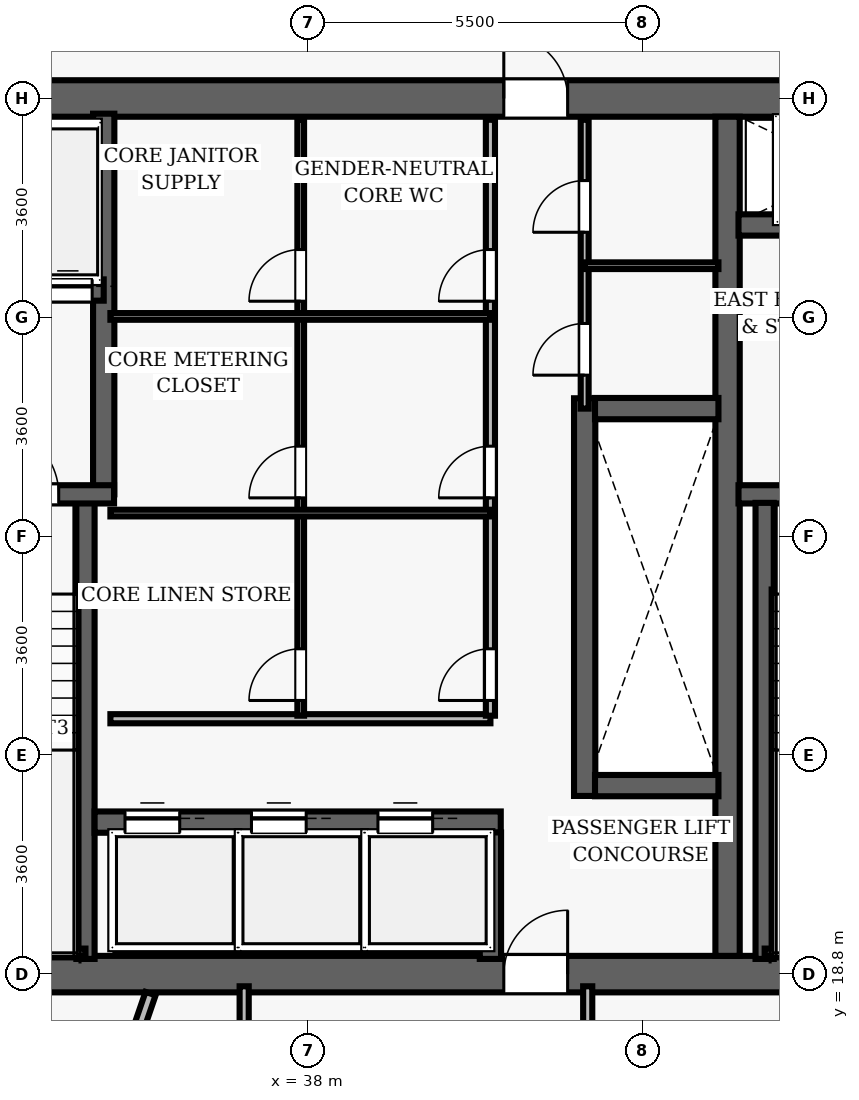
"""IFC4 building model, lengths in metres.
Left out: names, types, materials, properties, quantities, classifications, styles, units other than length and angle.
Written with IfcOpenShell. Run it as: python <this file> out.ifc"""

import sys

from ifc_helpers import new_model, si_unit, direction, frame, frame_2d, origin, place, context, subcontext, project, spatial, rectangle, extrude, element, fill, save


model = new_model("IFC4")
c1 = context("Model", 3, precision=1e-05, world=origin(), true_north=direction((0.0, 1.0)))
c2 = subcontext(c1, "Body", "Model", "MODEL_VIEW")
j1 = project(units=[si_unit("LENGTHUNIT", "METRE"), si_unit("PLANEANGLEUNIT", "RADIAN")], contexts=[c1])
p1 = place(None, origin())
s1 = spatial("IfcSite", under=j1, at=p1, CompositionType="ELEMENT")
p2 = place(p1, origin())
s2 = spatial("IfcBuilding", under=s1, at=p2, CompositionType="ELEMENT")
p3 = place(p2, frame((0.0, 0.0, 109.8)))
s3 = spatial("IfcBuildingStorey", under=s2, at=p3, CompositionType="ELEMENT", Elevation=109.8)
p4 = place(p3, frame((26.7, 18.8, 0.0), z_axis=(0.0, 0.0, 1.0), x_axis=(1.0, 0.0, 0.0)))
e1 = element("IfcWall", 1, at=p4, inside=s3, PredefinedType="SHEAR", context=c2, shape_type="SweptSolid", body=[
    extrude(rectangle(XDim=22.6, YDim=0.6, at=frame_2d((11.3, 0.0))), origin(), (0.0, 0.0, 1.0), 3.5),
])
p5 = place(p4, frame((14.52, 0.0, 0.0)))
e2 = element("IfcOpeningElement", 2, at=p5, cuts=e1, PredefinedType="OPENING", context=c2, shape_type="SweptSolid", body=[
    extrude(rectangle(XDim=1.05, YDim=2.15, at=frame_2d((0.525, 1.075))), frame((0.0, 0.31, 0.0), z_axis=(0.0, -1.0, 0.0), x_axis=(1.0, 0.0, 0.0)), (0.0, 0.0, 1.0), 0.62),
])
p6 = place(p3, frame((26.7, 33.2, 0.0), z_axis=(0.0, 0.0, 1.0), x_axis=(1.0, 0.0, 0.0)))
e3 = element("IfcWall", 3, at=p6, inside=s3, PredefinedType="SHEAR", context=c2, shape_type="SweptSolid", body=[
    extrude(rectangle(XDim=22.6, YDim=0.6, at=frame_2d((11.3, 0.0))), origin(), (0.0, 0.0, 1.0), 3.5),
])
p7 = place(p6, frame((4.62, 0.0, 0.0)))
e4 = element("IfcOpeningElement", 4, at=p7, cuts=e3, PredefinedType="OPENING", context=c2, shape_type="SweptSolid", body=[
    extrude(rectangle(XDim=1.05, YDim=2.15, at=frame_2d((0.525, 1.075))), frame((0.0, 0.31, 0.0), z_axis=(0.0, -1.0, 0.0), x_axis=(1.0, 0.0, 0.0)), (0.0, 0.0, 1.0), 0.62),
])
p8 = place(p6, frame((14.52, 0.0, 0.0)))
e5 = element("IfcOpeningElement", 5, at=p8, cuts=e3, PredefinedType="OPENING", context=c2, shape_type="SweptSolid", body=[
    extrude(rectangle(XDim=1.05, YDim=2.15, at=frame_2d((0.525, 1.075))), frame((0.0, 0.31, 0.0), z_axis=(0.0, -1.0, 0.0), x_axis=(1.0, 0.0, 0.0)), (0.0, 0.0, 1.0), 0.62),
])
p9 = place(p3, frame((44.9, 19.1, 0.0), z_axis=(0.0, 0.0, 1.0), x_axis=(0.0, 1.0, 0.0)))
e6 = element("IfcWall", 6, at=p9, inside=s3, PredefinedType="SHEAR", context=c2, shape_type="SweptSolid", body=[
    extrude(rectangle(XDim=13.8, YDim=0.4, at=frame_2d((6.9, 0.0))), origin(), (0.0, 0.0, 1.0), 3.5),
])
p10 = place(p3, frame((45.08, 26.69, 0.0), z_axis=(0.0, 0.0, 1.0), x_axis=(1.0, 0.0, 0.0)))
e7 = element("IfcWall", 7, at=p10, inside=s3, PredefinedType="SHEAR", context=c2, shape_type="SweptSolid", body=[
    extrude(rectangle(XDim=3.67, YDim=0.3, at=frame_2d((1.835, 0.0))), origin(), (0.0, 0.0, 1.0), 3.5),
])
p11 = place(p10, frame((1.05, 0.0, 0.0)))
e8 = element("IfcOpeningElement", 8, at=p11, cuts=e7, PredefinedType="OPENING", context=c2, shape_type="SweptSolid", body=[
    extrude(rectangle(XDim=1.1, YDim=2.15, at=frame_2d((0.55, 1.075))), frame((0.0, 0.16, 0.0), z_axis=(0.0, -1.0, 0.0), x_axis=(1.0, 0.0, 0.0)), (0.0, 0.0, 1.0), 0.32),
])
p12 = place(p3, frame((45.51, 19.05, 0.0), z_axis=(0.0, 0.0, 1.0), x_axis=(0.0, 1.0, 0.0)))
e9 = element("IfcWall", 9, at=p12, inside=s3, PredefinedType="SHEAR", context=c2, shape_type="SweptSolid", body=[
    extrude(rectangle(XDim=7.5, YDim=0.3, at=frame_2d((3.75, 0.0))), origin(), (0.0, 0.0, 1.0), 3.5),
])
p13 = place(p3, frame((45.51, 19.16, 0.0), z_axis=(0.0, 0.0, 1.0), x_axis=(1.0, 0.0, 0.0)))
e10 = element("IfcWall", 10, at=p13, inside=s3, PredefinedType="SHEAR", context=c2, shape_type="SweptSolid", body=[
    extrude(rectangle(XDim=3.095, YDim=0.12, at=frame_2d((1.547, 0.0))), origin(), (0.0, 0.0, 1.0), 3.5),
])
p14 = place(p3, frame((45.08, 31.12, 0.0), z_axis=(0.0, 0.0, 1.0), x_axis=(1.0, 0.0, 0.0)))
e11 = element("IfcWall", 11, at=p14, inside=s3, PredefinedType="SHEAR", context=c2, shape_type="SweptSolid", body=[
    extrude(rectangle(XDim=3.67, YDim=0.35, at=frame_2d((1.835, 0.0))), origin(), (0.0, 0.0, 1.0), 2.675),
])
p15 = place(p14, frame((1.25, 0.0, 0.0)))
e12 = element("IfcOpeningElement", 12, at=p15, cuts=e11, PredefinedType="OPENING", context=c2, shape_type="SweptSolid", body=[
    extrude(rectangle(XDim=1.1, YDim=2.15, at=frame_2d((0.55, 1.075))), frame((0.0, 0.185, 0.0), z_axis=(0.0, -1.0, 0.0), x_axis=(1.0, 0.0, 0.0)), (0.0, 0.0, 1.0), 0.37),
])
p16 = place(p3, frame((34.34, 19.05, 0.0), z_axis=(0.0, 0.0, 1.0), x_axis=(0.0, 1.0, 0.0)))
e13 = element("IfcWall", 13, at=p16, inside=s3, PredefinedType="SHEAR", context=c2, shape_type="SweptSolid", body=[
    extrude(rectangle(XDim=7.5, YDim=0.3, at=frame_2d((3.75, 0.0))), origin(), (0.0, 0.0, 1.0), 3.5),
])
p17 = place(p3, frame((34.64, 26.69, 0.0), z_axis=(0.0, 0.0, 1.0), x_axis=(0.0, 1.0, 0.0)))
e14 = element("IfcWall", 14, at=p17, inside=s3, PredefinedType="SHEAR", context=c2, shape_type="SweptSolid", body=[
    extrude(rectangle(XDim=6.26, YDim=0.35, at=frame_2d((3.13, 0.0))), origin(), (0.0, 0.0, 1.0), 3.5),
])
p18 = place(p3, frame((31.25, 26.69, 0.0), z_axis=(0.0, 0.0, 1.0), x_axis=(1.0, 0.0, 0.0)))
e15 = element("IfcWall", 15, at=p18, inside=s3, PredefinedType="SHEAR", context=c2, shape_type="SweptSolid", body=[
    extrude(rectangle(XDim=3.56, YDim=0.3, at=frame_2d((1.78, 0.0))), origin(), (0.0, 0.0, 1.0), 3.5),
])
p19 = place(p18, frame((1.55, 0.0, 0.0)))
e16 = element("IfcOpeningElement", 16, at=p19, cuts=e15, PredefinedType="OPENING", context=c2, shape_type="SweptSolid", body=[
    extrude(rectangle(XDim=1.1, YDim=2.15, at=frame_2d((0.55, 1.075))), frame((0.0, 0.16, 0.0), z_axis=(0.0, -1.0, 0.0), x_axis=(1.0, 0.0, 0.0)), (0.0, 0.0, 1.0), 0.32),
])
p20 = place(p3, frame((31.3, 19.16, 0.0), z_axis=(0.0, 0.0, 1.0), x_axis=(1.0, 0.0, 0.0)))
e17 = element("IfcWall", 17, at=p20, inside=s3, PredefinedType="SHEAR", context=c2, shape_type="SweptSolid", body=[
    extrude(rectangle(XDim=3.04, YDim=0.12, at=frame_2d((1.52, 0.0))), origin(), (0.0, 0.0, 1.0), 3.5),
])
p21 = place(p3, frame((32.23, 30.05, 0.0), z_axis=(0.0, 0.0, 1.0), x_axis=(1.0, 0.0, 0.0)))
e18 = element("IfcWall", 18, at=p21, inside=s3, PredefinedType="SHEAR", context=c2, shape_type="SweptSolid", body=[
    extrude(rectangle(XDim=2.41, YDim=0.35, at=frame_2d((1.205, 0.0))), origin(), (0.0, 0.0, 1.0), 2.675),
])
p22 = place(p21, frame((0.42, 0.0, 0.0)))
e19 = element("IfcOpeningElement", 19, at=p22, cuts=e18, PredefinedType="OPENING", context=c2, shape_type="SweptSolid", body=[
    extrude(rectangle(XDim=0.8, YDim=2.15, at=frame_2d((0.4, 1.075))), frame((0.0, 0.185, 0.0), z_axis=(0.0, -1.0, 0.0), x_axis=(1.0, 0.0, 0.0)), (0.0, 0.0, 1.0), 0.37),
])
p23 = place(p21, frame((1.42, 0.0, 0.0)))
e20 = element("IfcOpeningElement", 20, at=p23, cuts=e18, PredefinedType="OPENING", context=c2, shape_type="SweptSolid", body=[
    extrude(rectangle(XDim=0.8, YDim=2.15, at=frame_2d((0.4, 1.075))), frame((0.0, 0.185, 0.0), z_axis=(0.0, -1.0, 0.0), x_axis=(1.0, 0.0, 0.0)), (0.0, 0.0, 1.0), 0.37),
])
p24 = place(p3, frame((42.55, 21.73, 0.0), z_axis=(0.0, 0.0, 1.0), x_axis=(0.0, 1.0, 0.0)))
e21 = element("IfcWall", 21, at=p24, inside=s3, PredefinedType="SHEAR", context=c2, shape_type="SweptSolid", body=[
    extrude(rectangle(XDim=6.54, YDim=0.35, at=frame_2d((3.27, 0.0))), origin(), (0.0, 0.0, 1.0), 2.675),
])
for number, where, z_axis, x_axis in (
    (22, (42.72, 21.9, 0.0), (0.0, 0.0, 1.0), (1.0, 0.0, 0.0)),
    (23, (42.72, 28.1, 0.0), (0.0, 0.0, 1.0), (1.0, 0.0, 0.0)),
):
    element("IfcWall", number, at=place(p3, frame(where, z_axis=z_axis, x_axis=x_axis)), inside=s3, PredefinedType="SHEAR", context=c2, shape_type="SweptSolid", body=[
        extrude(rectangle(XDim=2.03, YDim=0.35, at=frame_2d((1.015, 0.0))), origin(), (0.0, 0.0, 1.0), 2.675),
    ])
p25 = place(p3, frame((34.49, 21.3, 0.0), z_axis=(0.0, 0.0, 1.0), x_axis=(1.0, 0.0, 0.0)))
e24 = element("IfcWall", 24, at=p25, inside=s3, PredefinedType="SHEAR", context=c2, shape_type="SweptSolid", body=[
    extrude(rectangle(XDim=6.68, YDim=0.35, at=frame_2d((3.34, 0.0))), origin(), (0.0, 0.0, 1.0), 2.675),
])
p26 = place(p25, frame((0.5, 0.0, 0.0)))
e25 = element("IfcOpeningElement", 25, at=p26, cuts=e24, PredefinedType="OPENING", context=c2, shape_type="SweptSolid", body=[
    extrude(rectangle(XDim=0.9, YDim=2.15, at=frame_2d((0.45, 1.075))), frame((0.0, 0.185, 0.0), z_axis=(0.0, -1.0, 0.0), x_axis=(1.0, 0.0, 0.0)), (0.0, 0.0, 1.0), 0.37),
])
p27 = place(p25, frame((2.58, 0.0, 0.0)))
e26 = element("IfcOpeningElement", 26, at=p27, cuts=e24, PredefinedType="OPENING", context=c2, shape_type="SweptSolid", body=[
    extrude(rectangle(XDim=0.9, YDim=2.15, at=frame_2d((0.45, 1.075))), frame((0.0, 0.185, 0.0), z_axis=(0.0, -1.0, 0.0), x_axis=(1.0, 0.0, 0.0)), (0.0, 0.0, 1.0), 0.37),
])
p28 = place(p25, frame((4.66, 0.0, 0.0)))
e27 = element("IfcOpeningElement", 27, at=p28, cuts=e24, PredefinedType="OPENING", context=c2, shape_type="SweptSolid", body=[
    extrude(rectangle(XDim=0.9, YDim=2.15, at=frame_2d((0.45, 1.075))), frame((0.0, 0.185, 0.0), z_axis=(0.0, -1.0, 0.0), x_axis=(1.0, 0.0, 0.0)), (0.0, 0.0, 1.0), 0.37),
])
p29 = place(p3, frame((41.0, 19.05, 0.0), z_axis=(0.0, 0.0, 1.0), x_axis=(0.0, 1.0, 0.0)))
e28 = element("IfcWall", 28, at=p29, inside=s3, PredefinedType="SHEAR", context=c2, shape_type="SweptSolid", body=[
    extrude(rectangle(XDim=2.08, YDim=0.35, at=frame_2d((1.04, 0.0))), origin(), (0.0, 0.0, 1.0), 2.675),
])
p30 = place(p3, frame((34.75, 23.0, 0.0), z_axis=(0.0, 0.0, 1.0), x_axis=(1.0, 0.0, 0.0)))
e29 = element("IfcWall", 29, at=p30, inside=s3, PredefinedType="PARTITIONING", context=c2, shape_type="SweptSolid", body=[
    extrude(rectangle(XDim=6.25, YDim=0.15, at=frame_2d((3.125, 0.0))), origin(), (0.0, 0.0, 1.0), 2.675),
])
p31 = place(p3, frame((41.0, 23.05, 0.0), z_axis=(0.0, 0.0, 1.0), x_axis=(0.0, 1.0, 0.0)))
e30 = element("IfcWall", 30, at=p31, inside=s3, PredefinedType="PARTITIONING", context=c2, shape_type="SweptSolid", body=[
    extrude(rectangle(XDim=9.8, YDim=0.15, at=frame_2d((4.9, 0.0))), origin(), (0.0, 0.0, 1.0), 2.675),
])
p32 = place(p31, frame((0.25, 0.0, 0.0)))
e31 = element("IfcOpeningElement", 31, at=p32, cuts=e30, PredefinedType="OPENING", context=c2, shape_type="SweptSolid", body=[
    extrude(rectangle(XDim=0.85, YDim=2.1, at=frame_2d((0.425, 1.05))), frame((0.0, 0.085, 0.0), z_axis=(0.0, -1.0, 0.0), x_axis=(1.0, 0.0, 0.0)), (0.0, 0.0, 1.0), 0.17),
])
p33 = place(p31, frame((3.582, 0.0, 0.0)))
e32 = element("IfcOpeningElement", 32, at=p33, cuts=e30, PredefinedType="OPENING", context=c2, shape_type="SweptSolid", body=[
    extrude(rectangle(XDim=0.85, YDim=2.1, at=frame_2d((0.425, 1.05))), frame((0.0, 0.085, 0.0), z_axis=(0.0, -1.0, 0.0), x_axis=(1.0, 0.0, 0.0)), (0.0, 0.0, 1.0), 0.17),
])
p34 = place(p31, frame((6.816, 0.0, 0.0)))
e33 = element("IfcOpeningElement", 33, at=p34, cuts=e30, PredefinedType="OPENING", context=c2, shape_type="SweptSolid", body=[
    extrude(rectangle(XDim=0.85, YDim=2.1, at=frame_2d((0.425, 1.05))), frame((0.0, 0.085, 0.0), z_axis=(0.0, -1.0, 0.0), x_axis=(1.0, 0.0, 0.0)), (0.0, 0.0, 1.0), 0.17),
])
p35 = place(p3, frame((37.88, 23.05, 0.0), z_axis=(0.0, 0.0, 1.0), x_axis=(0.0, 1.0, 0.0)))
e34 = element("IfcWall", 34, at=p35, inside=s3, PredefinedType="PARTITIONING", context=c2, shape_type="SweptSolid", body=[
    extrude(rectangle(XDim=9.8, YDim=0.11, at=frame_2d((4.9, 0.0))), origin(), (0.0, 0.0, 1.0), 2.675),
])
p36 = place(p35, frame((0.25, 0.0, 0.0)))
e35 = element("IfcOpeningElement", 35, at=p36, cuts=e34, PredefinedType="OPENING", context=c2, shape_type="SweptSolid", body=[
    extrude(rectangle(XDim=0.85, YDim=2.1, at=frame_2d((0.425, 1.05))), frame((0.0, 0.065, 0.0), z_axis=(0.0, -1.0, 0.0), x_axis=(1.0, 0.0, 0.0)), (0.0, 0.0, 1.0), 0.13),
])
p37 = place(p35, frame((3.582, 0.0, 0.0)))
e36 = element("IfcOpeningElement", 36, at=p37, cuts=e34, PredefinedType="OPENING", context=c2, shape_type="SweptSolid", body=[
    extrude(rectangle(XDim=0.85, YDim=2.1, at=frame_2d((0.425, 1.05))), frame((0.0, 0.065, 0.0), z_axis=(0.0, -1.0, 0.0), x_axis=(1.0, 0.0, 0.0)), (0.0, 0.0, 1.0), 0.13),
])
p38 = place(p35, frame((6.816, 0.0, 0.0)))
e37 = element("IfcOpeningElement", 37, at=p38, cuts=e34, PredefinedType="OPENING", context=c2, shape_type="SweptSolid", body=[
    extrude(rectangle(XDim=0.85, YDim=2.1, at=frame_2d((0.425, 1.05))), frame((0.0, 0.065, 0.0), z_axis=(0.0, -1.0, 0.0), x_axis=(1.0, 0.0, 0.0)), (0.0, 0.0, 1.0), 0.13),
])
for number, where, z_axis, x_axis in (
    (38, (34.75, 26.382, 0.0), (0.0, 0.0, 1.0), (1.0, 0.0, 0.0)),
    (39, (34.75, 29.616, 0.0), (0.0, 0.0, 1.0), (1.0, 0.0, 0.0)),
):
    element("IfcWall", number, at=place(p3, frame(where, z_axis=z_axis, x_axis=x_axis)), inside=s3, PredefinedType="PARTITIONING", context=c2, shape_type="SweptSolid", body=[
        extrude(rectangle(XDim=6.25, YDim=0.11, at=frame_2d((3.125, 0.0))), origin(), (0.0, 0.0, 1.0), 2.675),
    ])
p39 = place(p3, frame((42.55, 28.1, 0.0), z_axis=(0.0, 0.0, 1.0), x_axis=(0.0, 1.0, 0.0)))
e40 = element("IfcWall", 40, at=p39, inside=s3, PredefinedType="PARTITIONING", context=c2, shape_type="SweptSolid", body=[
    extrude(rectangle(XDim=4.75, YDim=0.13, at=frame_2d((2.375, 0.0))), origin(), (0.0, 0.0, 1.0), 2.675),
])
p40 = place(p39, frame((0.55, 0.0, 0.0)))
e41 = element("IfcOpeningElement", 41, at=p40, cuts=e40, PredefinedType="OPENING", context=c2, shape_type="SweptSolid", body=[
    extrude(rectangle(XDim=0.85, YDim=2.1, at=frame_2d((0.425, 1.05))), frame((0.0, 0.075, 0.0), z_axis=(0.0, -1.0, 0.0), x_axis=(1.0, 0.0, 0.0)), (0.0, 0.0, 1.0), 0.15),
])
p41 = place(p39, frame((2.9, 0.0, 0.0)))
e42 = element("IfcOpeningElement", 42, at=p41, cuts=e40, PredefinedType="OPENING", context=c2, shape_type="SweptSolid", body=[
    extrude(rectangle(XDim=0.85, YDim=2.1, at=frame_2d((0.425, 1.05))), frame((0.0, 0.075, 0.0), z_axis=(0.0, -1.0, 0.0), x_axis=(1.0, 0.0, 0.0)), (0.0, 0.0, 1.0), 0.15),
])
p42 = place(p3, frame((42.55, 30.45, 0.0), z_axis=(0.0, 0.0, 1.0), x_axis=(1.0, 0.0, 0.0)))
e43 = element("IfcWall", 43, at=p42, inside=s3, PredefinedType="PARTITIONING", context=c2, shape_type="SweptSolid", body=[
    extrude(rectangle(XDim=2.2, YDim=0.11, at=frame_2d((1.1, 0.0))), origin(), (0.0, 0.0, 1.0), 2.675),
])
p43 = place(p3, frame((36.95, 11.2, 0.0), z_axis=(0.0, 0.0, 1.0), x_axis=(0.0, 1.0, 0.0)))
e44 = element("IfcWall", 44, at=p43, inside=s3, PredefinedType="PARTITIONING", context=c2, shape_type="SweptSolid", body=[
    extrude(rectangle(XDim=7.4, YDim=0.15, at=frame_2d((3.7, 0.0))), origin(), (0.0, 0.0, 1.0), 2.675),
])
p44 = place(p43, frame((5.075, 0.0, 0.0)))
e45 = element("IfcOpeningElement", 45, at=p44, cuts=e44, PredefinedType="OPENING", context=c2, shape_type="SweptSolid", body=[
    extrude(rectangle(XDim=0.95, YDim=2.15, at=frame_2d((0.475, 1.075))), frame((0.0, 0.085, 0.0), z_axis=(0.0, -1.0, 0.0), x_axis=(1.0, 0.0, 0.0)), (0.0, 0.0, 1.0), 0.17),
])
p45 = place(p3, frame((42.6, 16.65, 0.0), z_axis=(0.0, 0.0, 1.0), x_axis=(0.0, 1.0, 0.0)))
e46 = element("IfcWall", 46, at=p45, inside=s3, PredefinedType="PARTITIONING", context=c2, shape_type="SweptSolid", body=[
    extrude(rectangle(XDim=1.95, YDim=0.15, at=frame_2d((0.975, 0.0))), origin(), (0.0, 0.0, 1.0), 2.675),
])
p46 = place(p3, frame((35.411, 18.48, 0.0), z_axis=(0.0, 0.0, 1.0), x_axis=(-0.32557542386, -0.945516072512, 0.0)))
e47 = element("IfcWall", 47, at=p46, inside=s3, PredefinedType="PARTITIONING", context=c2, shape_type="SweptSolid", body=[
    extrude(rectangle(XDim=15.003, YDim=0.175, at=frame_2d((7.502, 0.0))), origin(), (0.0, 0.0, 1.0), 2.675),
])
p47 = place(p19, origin())
e48 = element("IfcDoor", 48, at=p47, inside=s3, OperationType="SINGLE_SWING_LEFT", PredefinedType="DOOR", context=c2, shape_type="SweptSolid", body=[
    extrude(rectangle(XDim=1.1, YDim=2.15, at=frame_2d((0.55, 1.075))), frame((0.0, 0.025, 0.0), z_axis=(0.0, -1.0, 0.0), x_axis=(1.0, 0.0, 0.0)), (0.0, 0.0, 1.0), 0.05),
])
fill(e16, e48)
p48 = place(p8, origin())
e49 = element("IfcDoor", 49, at=p48, inside=s3, OperationType="SINGLE_SWING_LEFT", PredefinedType="DOOR", context=c2, shape_type="SweptSolid", body=[
    extrude(rectangle(XDim=1.05, YDim=2.15, at=frame_2d((0.525, 1.075))), frame((0.0, 0.025, 0.0), z_axis=(0.0, -1.0, 0.0), x_axis=(1.0, 0.0, 0.0)), (0.0, 0.0, 1.0), 0.05),
])
fill(e5, e49)
p49 = place(p5, origin())
e50 = element("IfcDoor", 50, at=p49, inside=s3, OperationType="SINGLE_SWING_RIGHT", PredefinedType="DOOR", context=c2, shape_type="SweptSolid", body=[
    extrude(rectangle(XDim=1.05, YDim=2.15, at=frame_2d((0.525, 1.075))), frame((0.0, 0.025, 0.0), z_axis=(0.0, -1.0, 0.0), x_axis=(1.0, 0.0, 0.0)), (0.0, 0.0, 1.0), 0.05),
])
fill(e2, e50)
p50 = place(p32, origin())
e51 = element("IfcDoor", 51, at=p50, inside=s3, OperationType="SINGLE_SWING_LEFT", PredefinedType="DOOR", context=c2, shape_type="SweptSolid", body=[
    extrude(rectangle(XDim=0.85, YDim=2.1, at=frame_2d((0.425, 1.05))), frame((0.0, 0.025, 0.0), z_axis=(0.0, -1.0, 0.0), x_axis=(1.0, 0.0, 0.0)), (0.0, 0.0, 1.0), 0.05),
])
fill(e31, e51)
p51 = place(p36, origin())
e52 = element("IfcDoor", 52, at=p51, inside=s3, OperationType="SINGLE_SWING_LEFT", PredefinedType="DOOR", context=c2, shape_type="SweptSolid", body=[
    extrude(rectangle(XDim=0.85, YDim=2.1, at=frame_2d((0.425, 1.05))), frame((0.0, 0.025, 0.0), z_axis=(0.0, -1.0, 0.0), x_axis=(1.0, 0.0, 0.0)), (0.0, 0.0, 1.0), 0.05),
])
fill(e35, e52)
p52 = place(p33, origin())
e53 = element("IfcDoor", 53, at=p52, inside=s3, OperationType="SINGLE_SWING_LEFT", PredefinedType="DOOR", context=c2, shape_type="SweptSolid", body=[
    extrude(rectangle(XDim=0.85, YDim=2.1, at=frame_2d((0.425, 1.05))), frame((0.0, 0.025, 0.0), z_axis=(0.0, -1.0, 0.0), x_axis=(1.0, 0.0, 0.0)), (0.0, 0.0, 1.0), 0.05),
])
fill(e32, e53)
p53 = place(p37, origin())
e54 = element("IfcDoor", 54, at=p53, inside=s3, OperationType="SINGLE_SWING_LEFT", PredefinedType="DOOR", context=c2, shape_type="SweptSolid", body=[
    extrude(rectangle(XDim=0.85, YDim=2.1, at=frame_2d((0.425, 1.05))), frame((0.0, 0.025, 0.0), z_axis=(0.0, -1.0, 0.0), x_axis=(1.0, 0.0, 0.0)), (0.0, 0.0, 1.0), 0.05),
])
fill(e36, e54)
p54 = place(p34, origin())
e55 = element("IfcDoor", 55, at=p54, inside=s3, OperationType="SINGLE_SWING_LEFT", PredefinedType="DOOR", context=c2, shape_type="SweptSolid", body=[
    extrude(rectangle(XDim=0.85, YDim=2.1, at=frame_2d((0.425, 1.05))), frame((0.0, 0.025, 0.0), z_axis=(0.0, -1.0, 0.0), x_axis=(1.0, 0.0, 0.0)), (0.0, 0.0, 1.0), 0.05),
])
fill(e33, e55)
p55 = place(p38, origin())
e56 = element("IfcDoor", 56, at=p55, inside=s3, OperationType="SINGLE_SWING_LEFT", PredefinedType="DOOR", context=c2, shape_type="SweptSolid", body=[
    extrude(rectangle(XDim=0.85, YDim=2.1, at=frame_2d((0.425, 1.05))), frame((0.0, 0.025, 0.0), z_axis=(0.0, -1.0, 0.0), x_axis=(1.0, 0.0, 0.0)), (0.0, 0.0, 1.0), 0.05),
])
fill(e37, e56)
p56 = place(p40, origin())
e57 = element("IfcDoor", 57, at=p56, inside=s3, OperationType="SINGLE_SWING_LEFT", PredefinedType="DOOR", context=c2, shape_type="SweptSolid", body=[
    extrude(rectangle(XDim=0.85, YDim=2.1, at=frame_2d((0.425, 1.05))), frame((0.0, 0.025, 0.0), z_axis=(0.0, -1.0, 0.0), x_axis=(1.0, 0.0, 0.0)), (0.0, 0.0, 1.0), 0.05),
])
fill(e41, e57)
p57 = place(p41, origin())
e58 = element("IfcDoor", 58, at=p57, inside=s3, OperationType="SINGLE_SWING_LEFT", PredefinedType="DOOR", context=c2, shape_type="SweptSolid", body=[
    extrude(rectangle(XDim=0.85, YDim=2.1, at=frame_2d((0.425, 1.05))), frame((0.0, 0.025, 0.0), z_axis=(0.0, -1.0, 0.0), x_axis=(1.0, 0.0, 0.0)), (0.0, 0.0, 1.0), 0.05),
])
fill(e42, e58)
p58 = place(p26, origin())
e59 = element("IfcDoor", 59, at=p58, inside=s3, OperationType="SLIDING_TO_LEFT", PredefinedType="DOOR", context=c2, shape_type="SweptSolid", body=[
    extrude(rectangle(XDim=0.9, YDim=2.15, at=frame_2d((0.45, 1.075))), frame((0.0, 0.025, 0.0), z_axis=(0.0, -1.0, 0.0), x_axis=(1.0, 0.0, 0.0)), (0.0, 0.0, 1.0), 0.05),
])
fill(e25, e59)
p59 = place(p27, origin())
e60 = element("IfcDoor", 60, at=p59, inside=s3, OperationType="SLIDING_TO_LEFT", PredefinedType="DOOR", context=c2, shape_type="SweptSolid", body=[
    extrude(rectangle(XDim=0.9, YDim=2.15, at=frame_2d((0.45, 1.075))), frame((0.0, 0.025, 0.0), z_axis=(0.0, -1.0, 0.0), x_axis=(1.0, 0.0, 0.0)), (0.0, 0.0, 1.0), 0.05),
])
fill(e26, e60)
p60 = place(p28, origin())
e61 = element("IfcDoor", 61, at=p60, inside=s3, OperationType="SLIDING_TO_LEFT", PredefinedType="DOOR", context=c2, shape_type="SweptSolid", body=[
    extrude(rectangle(XDim=0.9, YDim=2.15, at=frame_2d((0.45, 1.075))), frame((0.0, 0.025, 0.0), z_axis=(0.0, -1.0, 0.0), x_axis=(1.0, 0.0, 0.0)), (0.0, 0.0, 1.0), 0.05),
])
fill(e27, e61)
p61 = place(p23, origin())
e62 = element("IfcDoor", 62, at=p61, inside=s3, OperationType="SLIDING_TO_LEFT", PredefinedType="DOOR", context=c2, shape_type="SweptSolid", body=[
    extrude(rectangle(XDim=0.8, YDim=2.15, at=frame_2d((0.4, 1.075))), frame((0.0, 0.025, 0.0), z_axis=(0.0, -1.0, 0.0), x_axis=(1.0, 0.0, 0.0)), (0.0, 0.0, 1.0), 0.05),
])
fill(e20, e62)
save(model, sys.argv[1])
